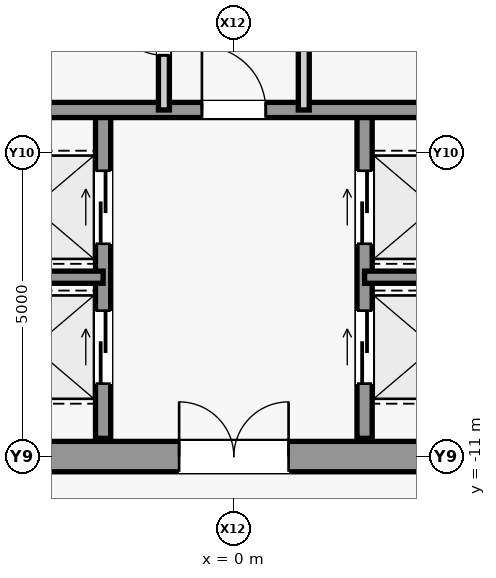
"""IFC4 building model, lengths in metres.
Left out: names, types, materials, properties, quantities, classifications, styles, units other than length and angle.
Written with IfcOpenShell. Run it as: python <this file> out.ifc"""

import sys

from ifc_helpers import new_model, si_unit, direction, frame, frame_2d, origin, place, context, subcontext, project, spatial, rectangle, extrude, source, transform, mapped, element, fill, save


model = new_model("IFC4")
c1 = context("Model", 3, precision=1e-05, world=origin(), true_north=direction((0.0, 1.0)))
c2 = subcontext(c1, "Body", "Model", "MODEL_VIEW")
j1 = project(units=[si_unit("LENGTHUNIT", "METRE"), si_unit("PLANEANGLEUNIT", "RADIAN")], contexts=[c1])
p1 = place(None, origin())
s1 = spatial("IfcSite", under=j1, at=p1, CompositionType="ELEMENT")
p2 = place(p1, origin())
s2 = spatial("IfcBuilding", under=s1, at=p2, CompositionType="ELEMENT")
p3 = place(p2, frame((0.0, 0.0, 57.8)))
s3 = spatial("IfcBuildingStorey", under=s2, at=p3, CompositionType="ELEMENT", Elevation=57.8)
m1 = source(origin(), c2, "Body", "SweptSolid", [
    extrude(rectangle(XDim=9.2, YDim=0.5, at=frame_2d((4.6, 0.0))), origin(), (0.0, 0.0, 1.0), 3.94),
])
p4 = place(p3, frame((-4.6, -11.0, 0.0), z_axis=(0.0, 0.0, 1.0), x_axis=(1.0, 0.0, 0.0)))
e1 = element("IfcWall", 1, at=p4, inside=s3, PredefinedType="SHEAR", context=c2, shape_type="MappedRepresentation", body=[
    mapped(m1, transform((0.0, 0.0, 0.0), scale=1.0)),
])
m2 = source(origin(), c2, "Body", "SweptSolid", [
    extrude(rectangle(XDim=1.8, YDim=2.25, at=frame_2d((0.9, 1.125))), frame((0.0, 0.26, 0.0), z_axis=(0.0, -1.0, 0.0), x_axis=(1.0, 0.0, 0.0)), (0.0, 0.0, 1.0), 0.52),
])
p5 = place(p4, frame((3.7, 0.0, 0.0)))
e2 = element("IfcOpeningElement", 2, at=p5, cuts=e1, PredefinedType="OPENING", context=c2, shape_type="MappedRepresentation", body=[
    mapped(m2, transform((0.0, 0.0, 0.0), scale=1.0)),
])
m3 = source(origin(), c2, "Body", "SweptSolid", [
    extrude(rectangle(XDim=5.4, YDim=0.25, at=frame_2d((2.7, 0.0))), origin(), (0.0, 0.0, 1.0), 3.94),
])
p6 = place(p3, frame((-2.15, -10.7, 0.0), z_axis=(0.0, 0.0, 1.0), x_axis=(0.0, 1.0, 0.0)))
e3 = element("IfcWall", 3, at=p6, inside=s3, PredefinedType="SHEAR", context=c2, shape_type="MappedRepresentation", body=[
    mapped(m3, transform((0.0, 0.0, 0.0), scale=1.0)),
])
m4 = source(origin(), c2, "Body", "SweptSolid", [
    extrude(rectangle(XDim=1.2, YDim=2.3, at=frame_2d((0.6, 1.15))), frame((0.0, 0.135, 0.0), z_axis=(0.0, -1.0, 0.0), x_axis=(1.0, 0.0, 0.0)), (0.0, 0.0, 1.0), 0.27),
])
p7 = place(p6, frame((0.9, 0.0, 0.0)))
e4 = element("IfcOpeningElement", 4, at=p7, cuts=e3, PredefinedType="OPENING", context=c2, shape_type="MappedRepresentation", body=[
    mapped(m4, transform((0.0, 0.0, 0.0), scale=1.0)),
])
p8 = place(p6, frame((3.2, 0.0, 0.0)))
e5 = element("IfcOpeningElement", 5, at=p8, cuts=e3, PredefinedType="OPENING", context=c2, shape_type="MappedRepresentation", body=[
    mapped(m4, transform((0.0, 0.0, 0.0), scale=1.0)),
])
p9 = place(p3, frame((2.15, -10.7, 0.0), z_axis=(0.0, 0.0, 1.0), x_axis=(0.0, 1.0, 0.0)))
e6 = element("IfcWall", 6, at=p9, inside=s3, PredefinedType="SHEAR", context=c2, shape_type="MappedRepresentation", body=[
    mapped(m3, transform((0.0, 0.0, 0.0), scale=1.0)),
])
p10 = place(p9, frame((0.9, 0.0, 0.0)))
e7 = element("IfcOpeningElement", 7, at=p10, cuts=e6, PredefinedType="OPENING", context=c2, shape_type="MappedRepresentation", body=[
    mapped(m4, transform((0.0, 0.0, 0.0), scale=1.0)),
])
p11 = place(p9, frame((3.2, 0.0, 0.0)))
e8 = element("IfcOpeningElement", 8, at=p11, cuts=e6, PredefinedType="OPENING", context=c2, shape_type="MappedRepresentation", body=[
    mapped(m4, transform((0.0, 0.0, 0.0), scale=1.0)),
])
m5 = source(origin(), c2, "Body", "SweptSolid", [
    extrude(rectangle(XDim=2.45, YDim=0.2, at=frame_2d((1.225, 0.0))), origin(), (0.0, 0.0, 1.0), 3.94),
])
for number, where, z_axis, x_axis in (
    (9, (-4.6, -8.05, 0.0), (0.0, 0.0, 1.0), (1.0, 0.0, 0.0)),
    (10, (2.15, -8.05, 0.0), (0.0, 0.0, 1.0), (1.0, 0.0, 0.0)),
):
    element("IfcWall", number, at=place(p3, frame(where, z_axis=z_axis, x_axis=x_axis)), inside=s3, PredefinedType="SHEAR", context=c2, shape_type="MappedRepresentation", body=[
        mapped(m5, transform((0.0, 0.0, 0.0), scale=1.0)),
    ])
m6 = source(origin(), c2, "Body", "SweptSolid", [
    extrude(rectangle(XDim=9.2, YDim=0.25, at=frame_2d((4.6, 0.0))), origin(), (0.0, 0.0, 1.0), 3.94),
])
p12 = place(p3, frame((-4.6, -5.3, 0.0), z_axis=(0.0, 0.0, 1.0), x_axis=(1.0, 0.0, 0.0)))
e11 = element("IfcWall", 11, at=p12, inside=s3, PredefinedType="SHEAR", context=c2, shape_type="MappedRepresentation", body=[
    mapped(m6, transform((0.0, 0.0, 0.0), scale=1.0)),
])
m7 = source(origin(), c2, "Body", "SweptSolid", [
    extrude(rectangle(XDim=1.05, YDim=2.2, at=frame_2d((0.525, 1.1))), frame((0.0, 0.135, 0.0), z_axis=(0.0, -1.0, 0.0), x_axis=(1.0, 0.0, 0.0)), (0.0, 0.0, 1.0), 0.27),
])
p13 = place(p12, frame((4.075, 0.0, 0.0)))
e12 = element("IfcOpeningElement", 12, at=p13, cuts=e11, PredefinedType="OPENING", context=c2, shape_type="MappedRepresentation", body=[
    mapped(m7, transform((0.0, 0.0, 0.0), scale=1.0)),
])
m8 = source(origin(), c2, "Body", "SweptSolid", [
    extrude(rectangle(XDim=10.6, YDim=0.18, at=frame_2d((5.3, 0.0))), origin(), (0.0, 0.0, 1.0), 3.94),
])
p14 = place(p3, frame((-1.15, -5.3, 0.0), z_axis=(0.0, 0.0, 1.0), x_axis=(0.0, 1.0, 0.0)))
e13 = element("IfcWall", 13, at=p14, inside=s3, PredefinedType="PARTITIONING", context=c2, shape_type="MappedRepresentation", body=[
    mapped(m8, transform((0.0, 0.0, 0.0), scale=1.0)),
])
m9 = source(origin(), c2, "Body", "SweptSolid", [
    extrude(rectangle(XDim=0.9, YDim=2.15, at=frame_2d((0.45, 1.075))), frame((0.0, 0.1, 0.0), z_axis=(0.0, -1.0, 0.0), x_axis=(1.0, 0.0, 0.0)), (0.0, 0.0, 1.0), 0.2),
])
p15 = place(p14, frame((0.9, 0.0, 0.0)))
e14 = element("IfcOpeningElement", 14, at=p15, cuts=e13, PredefinedType="OPENING", context=c2, shape_type="MappedRepresentation", body=[
    mapped(m9, transform((0.0, 0.0, 0.0), scale=1.0)),
])
p16 = place(p14, frame((3.65, 0.0, 0.0)))
e15 = element("IfcOpeningElement", 15, at=p16, cuts=e13, PredefinedType="OPENING", context=c2, shape_type="MappedRepresentation", body=[
    mapped(m9, transform((0.0, 0.0, 0.0), scale=1.0)),
])
p17 = place(p14, frame((6.35, 0.0, 0.0)))
e16 = element("IfcOpeningElement", 16, at=p17, cuts=e13, PredefinedType="OPENING", context=c2, shape_type="MappedRepresentation", body=[
    mapped(m9, transform((0.0, 0.0, 0.0), scale=1.0)),
])
p18 = place(p14, frame((8.25, 0.0, 0.0)))
e17 = element("IfcOpeningElement", 17, at=p18, cuts=e13, PredefinedType="OPENING", context=c2, shape_type="MappedRepresentation", body=[
    mapped(m9, transform((0.0, 0.0, 0.0), scale=1.0)),
])
p19 = place(p14, frame((9.475, 0.0, 0.0)))
e18 = element("IfcOpeningElement", 18, at=p19, cuts=e13, PredefinedType="OPENING", context=c2, shape_type="MappedRepresentation", body=[
    mapped(m9, transform((0.0, 0.0, 0.0), scale=1.0)),
])
p20 = place(p3, frame((1.15, -5.3, 0.0), z_axis=(0.0, 0.0, 1.0), x_axis=(0.0, 1.0, 0.0)))
e19 = element("IfcWall", 19, at=p20, inside=s3, PredefinedType="PARTITIONING", context=c2, shape_type="MappedRepresentation", body=[
    mapped(m8, transform((0.0, 0.0, 0.0), scale=1.0)),
])
p21 = place(p20, frame((2.6, 0.0, 0.0)))
e20 = element("IfcOpeningElement", 20, at=p21, cuts=e19, PredefinedType="OPENING", context=c2, shape_type="MappedRepresentation", body=[
    mapped(m9, transform((0.0, 0.0, 0.0), scale=1.0)),
])
p22 = place(p20, frame((7.25, 0.0, 0.0)))
e21 = element("IfcOpeningElement", 21, at=p22, cuts=e19, PredefinedType="OPENING", context=c2, shape_type="MappedRepresentation", body=[
    mapped(m9, transform((0.0, 0.0, 0.0), scale=1.0)),
])
p23 = place(p20, frame((9.475, 0.0, 0.0)))
e22 = element("IfcOpeningElement", 22, at=p23, cuts=e19, PredefinedType="OPENING", context=c2, shape_type="MappedRepresentation", body=[
    mapped(m9, transform((0.0, 0.0, 0.0), scale=1.0)),
])
m10 = source(origin(), c2, "Body", "SweptSolid", [
    extrude(rectangle(XDim=1.05, YDim=2.2, at=frame_2d((0.525, 1.1))), frame((0.0, 0.025, 0.0), z_axis=(0.0, -1.0, 0.0), x_axis=(1.0, 0.0, 0.0)), (0.0, 0.0, 1.0), 0.05),
])
p24 = place(p13, origin())
e23 = element("IfcDoor", 23, at=p24, inside=s3, OperationType="SINGLE_SWING_LEFT", PredefinedType="DOOR", context=c2, shape_type="MappedRepresentation", body=[
    mapped(m10, transform((0.0, 0.0, 0.0), scale=1.0)),
])
fill(e12, e23)
m11 = source(origin(), c2, "Body", "SweptSolid", [
    extrude(rectangle(XDim=1.8, YDim=2.25, at=frame_2d((0.9, 1.125))), frame((0.0, 0.025, 0.0), z_axis=(0.0, -1.0, 0.0), x_axis=(1.0, 0.0, 0.0)), (0.0, 0.0, 1.0), 0.05),
])
p25 = place(p5, origin())
e24 = element("IfcDoor", 24, at=p25, inside=s3, OperationType="SINGLE_SWING_LEFT", PredefinedType="DOOR", context=c2, shape_type="MappedRepresentation", body=[
    mapped(m11, transform((0.0, 0.0, 0.0), scale=1.0)),
])
fill(e2, e24)
m12 = source(origin(), c2, "Body", "SweptSolid", [
    extrude(rectangle(XDim=0.9, YDim=2.15, at=frame_2d((0.45, 1.075))), frame((0.0, 0.025, 0.0), z_axis=(0.0, -1.0, 0.0), x_axis=(1.0, 0.0, 0.0)), (0.0, 0.0, 1.0), 0.05),
])
p26 = place(p15, origin())
e25 = element("IfcDoor", 25, at=p26, inside=s3, OperationType="SINGLE_SWING_RIGHT", PredefinedType="DOOR", context=c2, shape_type="MappedRepresentation", body=[
    mapped(m12, transform((0.0, 0.0, 0.0), scale=1.0)),
])
fill(e14, e25)
m13 = source(origin(), c2, "Body", "SweptSolid", [
    extrude(rectangle(XDim=1.2, YDim=2.3, at=frame_2d((0.6, 1.15))), frame((0.0, 0.025, 0.0), z_axis=(0.0, -1.0, 0.0), x_axis=(1.0, 0.0, 0.0)), (0.0, 0.0, 1.0), 0.05),
])
p27 = place(p7, origin())
e26 = element("IfcDoor", 26, at=p27, inside=s3, OperationType="SLIDING_TO_LEFT", PredefinedType="DOOR", context=c2, shape_type="MappedRepresentation", body=[
    mapped(m13, transform((0.0, 0.0, 0.0), scale=1.0)),
])
fill(e4, e26)
p28 = place(p10, origin())
e27 = element("IfcDoor", 27, at=p28, inside=s3, OperationType="SLIDING_TO_LEFT", PredefinedType="DOOR", context=c2, shape_type="MappedRepresentation", body=[
    mapped(m13, transform((0.0, 0.0, 0.0), scale=1.0)),
])
fill(e7, e27)
p29 = place(p8, origin())
e28 = element("IfcDoor", 28, at=p29, inside=s3, OperationType="SLIDING_TO_LEFT", PredefinedType="DOOR", context=c2, shape_type="MappedRepresentation", body=[
    mapped(m13, transform((0.0, 0.0, 0.0), scale=1.0)),
])
fill(e5, e28)
p30 = place(p11, origin())
e29 = element("IfcDoor", 29, at=p30, inside=s3, OperationType="SLIDING_TO_LEFT", PredefinedType="DOOR", context=c2, shape_type="MappedRepresentation", body=[
    mapped(m13, transform((0.0, 0.0, 0.0), scale=1.0)),
])
fill(e8, e29)
save(model, sys.argv[1])
